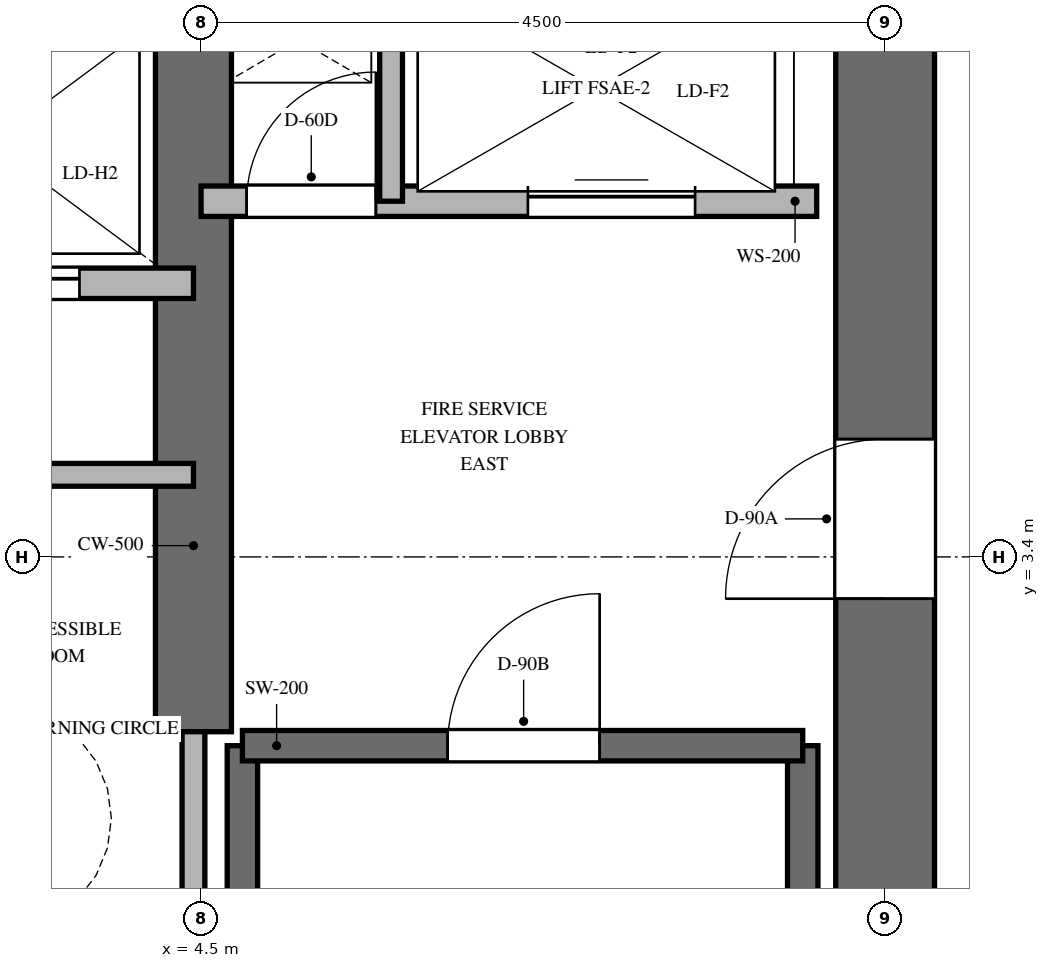
"""IFC4 building model, lengths in metres.
Left out: names, types, materials, properties, quantities, classifications, styles, units other than length and angle.
Written with IfcOpenShell. Run it as: python <this file> out.ifc"""

import sys

from ifc_helpers import new_model, si_unit, direction, frame, frame_2d, origin, place, context, subcontext, project, spatial, rectangle, extrude, element, fill, save


model = new_model("IFC4")
c1 = context("Model", 3, precision=1e-05, world=origin(), true_north=direction((0.0, 1.0)))
c2 = subcontext(c1, "Body", "Model", "MODEL_VIEW")
j1 = project(units=[si_unit("LENGTHUNIT", "METRE"), si_unit("PLANEANGLEUNIT", "RADIAN")], contexts=[c1])
p1 = place(None, origin())
s1 = spatial("IfcSite", under=j1, at=p1, CompositionType="ELEMENT")
p2 = place(p1, origin())
s2 = spatial("IfcBuilding", under=s1, at=p2, CompositionType="ELEMENT")
p3 = place(p2, frame((0.0, 0.0, 297.6)))
s3 = spatial("IfcBuildingStorey", under=s2, at=p3, CompositionType="ELEMENT", Elevation=297.6)
p4 = place(p3, frame((9.0, -7.175, 0.0), z_axis=(0.0, 0.0, 1.0), x_axis=(0.0, 1.0, 0.0)))
e1 = element("IfcWall", 1, at=p4, inside=s3, PredefinedType="SHEAR", context=c2, shape_type="SweptSolid", body=[
    extrude(rectangle(XDim=14.35, YDim=0.65, at=frame_2d((7.175, 0.0))), origin(), (0.0, 0.0, 1.0), 3.9),
])
p5 = place(p4, frame((10.3, 0.0, 0.0)))
e2 = element("IfcOpeningElement", 2, at=p5, cuts=e1, PredefinedType="OPENING", context=c2, shape_type="SweptSolid", body=[
    extrude(rectangle(XDim=1.05, YDim=2.15, at=frame_2d((0.525, 1.075))), frame((0.0, 0.335, 0.0), z_axis=(0.0, -1.0, 0.0), x_axis=(1.0, 0.0, 0.0)), (0.0, 0.0, 1.0), 0.67),
])
p6 = place(p3, frame((4.45, 2.25, 0.0), z_axis=(0.0, 0.0, 1.0), x_axis=(0.0, 1.0, 0.0)))
e3 = element("IfcWall", 3, at=p6, inside=s3, PredefinedType="SHEAR", context=c2, shape_type="SweptSolid", body=[
    extrude(rectangle(XDim=4.925, YDim=0.5, at=frame_2d((2.462, 0.0))), origin(), (0.0, 0.0, 1.0), 3.9),
])
for number, where, z_axis, x_axis in (
    (4, (4.772, -6.985, 0.0), (0.0, 0.0, 1.0), (0.0, 1.0, 0.0)),
    (5, (8.458, -6.985, 0.0), (0.0, 0.0, 1.0), (0.0, 1.0, 0.0)),
):
    element("IfcWall", number, at=place(p3, frame(where, z_axis=z_axis, x_axis=x_axis)), inside=s3, PredefinedType="SHEAR", context=c2, shape_type="SweptSolid", body=[
        extrude(rectangle(XDim=9.143, YDim=0.2, at=frame_2d((4.572, 0.0))), origin(), (0.0, 0.0, 1.0), 3.9),
    ])
p7 = place(p3, frame((4.772, 2.158, 0.0), z_axis=(0.0, 0.0, 1.0), x_axis=(1.0, 0.0, 0.0)))
e6 = element("IfcWall", 6, at=p7, inside=s3, PredefinedType="SHEAR", context=c2, shape_type="SweptSolid", body=[
    extrude(rectangle(XDim=3.686, YDim=0.2, at=frame_2d((1.843, 0.0))), origin(), (0.0, 0.0, 1.0), 3.9),
])
p8 = place(p7, frame((1.35, 0.0, 0.0)))
e7 = element("IfcOpeningElement", 7, at=p8, cuts=e6, PredefinedType="OPENING", context=c2, shape_type="SweptSolid", body=[
    extrude(rectangle(XDim=1.0, YDim=2.15, at=frame_2d((0.5, 1.075))), frame((0.0, 0.11, 0.0), z_axis=(0.0, -1.0, 0.0), x_axis=(1.0, 0.0, 0.0)), (0.0, 0.0, 1.0), 0.22),
])
p9 = place(p3, frame((4.5, 5.74, 0.0), z_axis=(0.0, 0.0, 1.0), x_axis=(1.0, 0.0, 0.0)))
e8 = element("IfcWall", 8, at=p9, inside=s3, PredefinedType="PARTITIONING", context=c2, shape_type="SweptSolid", body=[
    extrude(rectangle(XDim=4.05, YDim=0.2, at=frame_2d((2.025, 0.0))), origin(), (0.0, 0.0, 1.0), 3.6),
])
p10 = place(p9, frame((0.3, 0.0, 0.0)))
e9 = element("IfcOpeningElement", 9, at=p10, cuts=e8, PredefinedType="OPENING", context=c2, shape_type="SweptSolid", body=[
    extrude(rectangle(XDim=0.85, YDim=2.03, at=frame_2d((0.425, 1.015))), frame((0.0, 0.11, 0.0), z_axis=(0.0, -1.0, 0.0), x_axis=(1.0, 0.0, 0.0)), (0.0, 0.0, 1.0), 0.22),
])
p11 = place(p9, frame((2.15, 0.0, 0.0)))
e10 = element("IfcOpeningElement", 10, at=p11, cuts=e8, PredefinedType="OPENING", context=c2, shape_type="SweptSolid", body=[
    extrude(rectangle(XDim=1.1, YDim=2.2, at=frame_2d((0.55, 1.1))), frame((0.0, 0.11, 0.0), z_axis=(0.0, -1.0, 0.0), x_axis=(1.0, 0.0, 0.0)), (0.0, 0.0, 1.0), 0.22),
])
p12 = place(p3, frame((5.75, 5.74, 0.0), z_axis=(0.0, 0.0, 1.0), x_axis=(0.0, 1.0, 0.0)))
e11 = element("IfcWall", 11, at=p12, inside=s3, PredefinedType="PARTITIONING", context=c2, shape_type="SweptSolid", body=[
    extrude(rectangle(XDim=1.41, YDim=0.15, at=frame_2d((0.705, 0.0))), origin(), (0.0, 0.0, 1.0), 3.6),
])
p13 = place(p3, frame((1.85, 5.2, 0.0), z_axis=(0.0, 0.0, 1.0), x_axis=(1.0, 0.0, 0.0)))
e12 = element("IfcWall", 12, at=p13, inside=s3, PredefinedType="PARTITIONING", context=c2, shape_type="SweptSolid", body=[
    extrude(rectangle(XDim=2.6, YDim=0.2, at=frame_2d((1.3, 0.0))), origin(), (0.0, 0.0, 1.0), 3.6),
])
p14 = place(p13, frame((0.75, 0.0, 0.0)))
e13 = element("IfcOpeningElement", 13, at=p14, cuts=e12, PredefinedType="OPENING", context=c2, shape_type="SweptSolid", body=[
    extrude(rectangle(XDim=1.1, YDim=2.2, at=frame_2d((0.55, 1.1))), frame((0.0, 0.11, 0.0), z_axis=(0.0, -1.0, 0.0), x_axis=(1.0, 0.0, 0.0)), (0.0, 0.0, 1.0), 0.22),
])
p15 = place(p3, frame((4.45, -1.972, 0.0), z_axis=(0.0, 0.0, 1.0), x_axis=(0.0, 1.0, 0.0)))
e14 = element("IfcWall", 14, at=p15, inside=s3, PredefinedType="PARTITIONING", context=c2, shape_type="SweptSolid", body=[
    extrude(rectangle(XDim=4.222, YDim=0.15, at=frame_2d((2.111, 0.0))), origin(), (0.0, 0.0, 1.0), 3.6),
])
p16 = place(p3, frame((1.9, 3.94, 0.0), z_axis=(0.0, 0.0, 1.0), x_axis=(1.0, 0.0, 0.0)))
e15 = element("IfcWall", 15, at=p16, inside=s3, PredefinedType="PARTITIONING", context=c2, shape_type="SweptSolid", body=[
    extrude(rectangle(XDim=2.55, YDim=0.15, at=frame_2d((1.275, 0.0))), origin(), (0.0, 0.0, 1.0), 3.6),
])
p17 = place(p8, origin())
e16 = element("IfcDoor", 16, at=p17, inside=s3, OperationType="SINGLE_SWING_RIGHT", PredefinedType="DOOR", context=c2, shape_type="SweptSolid", body=[
    extrude(rectangle(XDim=1.0, YDim=2.15, at=frame_2d((0.5, 1.075))), frame((0.0, 0.025, 0.0), z_axis=(0.0, -1.0, 0.0), x_axis=(1.0, 0.0, 0.0)), (0.0, 0.0, 1.0), 0.05),
])
fill(e7, e16)
p18 = place(p5, origin())
e17 = element("IfcDoor", 17, at=p18, inside=s3, OperationType="SINGLE_SWING_LEFT", PredefinedType="DOOR", context=c2, shape_type="SweptSolid", body=[
    extrude(rectangle(XDim=1.05, YDim=2.15, at=frame_2d((0.525, 1.075))), frame((0.0, 0.025, 0.0), z_axis=(0.0, -1.0, 0.0), x_axis=(1.0, 0.0, 0.0)), (0.0, 0.0, 1.0), 0.05),
])
fill(e2, e17)
p19 = place(p10, origin())
e18 = element("IfcDoor", 18, at=p19, inside=s3, OperationType="SINGLE_SWING_RIGHT", PredefinedType="DOOR", context=c2, shape_type="SweptSolid", body=[
    extrude(rectangle(XDim=0.85, YDim=2.03, at=frame_2d((0.425, 1.015))), frame((0.0, 0.025, 0.0), z_axis=(0.0, -1.0, 0.0), x_axis=(1.0, 0.0, 0.0)), (0.0, 0.0, 1.0), 0.05),
])
fill(e9, e18)
p20 = place(p11, origin())
e19 = element("IfcDoor", 19, at=p20, inside=s3, OperationType="SLIDING_TO_RIGHT", PredefinedType="DOOR", context=c2, shape_type="SweptSolid", body=[
    extrude(rectangle(XDim=1.1, YDim=2.2, at=frame_2d((0.55, 1.1))), frame((0.0, 0.025, 0.0), z_axis=(0.0, -1.0, 0.0), x_axis=(1.0, 0.0, 0.0)), (0.0, 0.0, 1.0), 0.05),
])
fill(e10, e19)
p21 = place(p14, origin())
e20 = element("IfcDoor", 20, at=p21, inside=s3, OperationType="SLIDING_TO_RIGHT", PredefinedType="DOOR", context=c2, shape_type="SweptSolid", body=[
    extrude(rectangle(XDim=1.1, YDim=2.2, at=frame_2d((0.55, 1.1))), frame((0.0, 0.025, 0.0), z_axis=(0.0, -1.0, 0.0), x_axis=(1.0, 0.0, 0.0)), (0.0, 0.0, 1.0), 0.05),
])
fill(e13, e20)
save(model, sys.argv[1])
